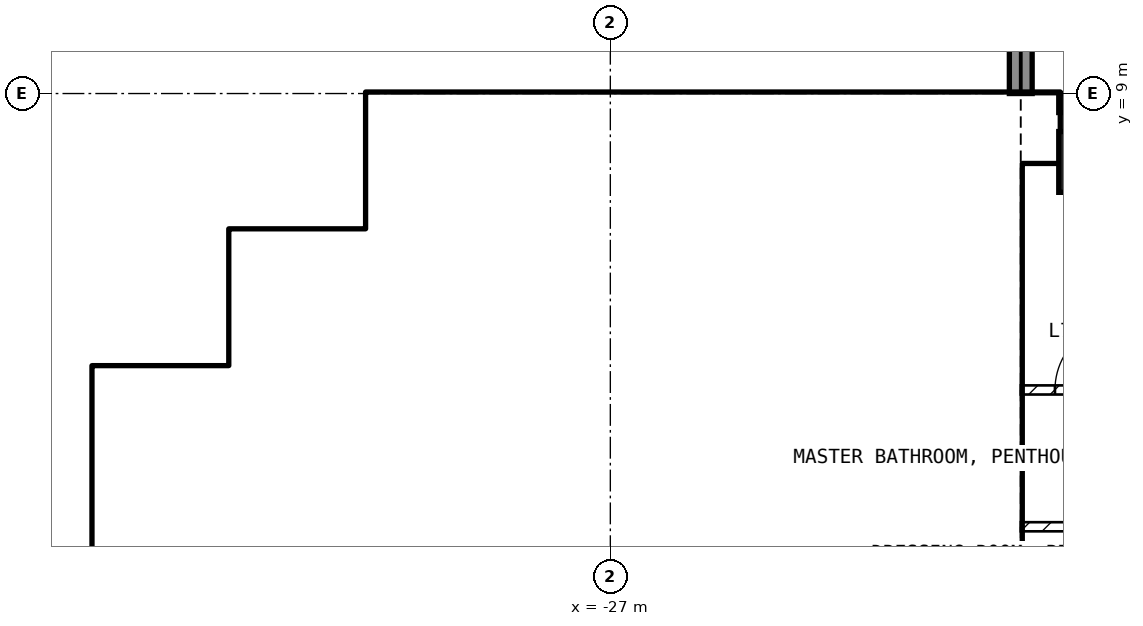
"""IFC4 building model, lengths in metres.
Left out: names, types, materials, properties, quantities, classifications, styles, units other than length and angle.
Written with IfcOpenShell. Run it as: python <this file> out.ifc"""

import sys

from ifc_helpers import new_model, si_unit, direction, frame, frame_2d, origin, origin_2d, place, context, subcontext, project, spatial, rectangle, extrude, element, fill, save


model = new_model("IFC4")
c1 = context("Model", 3, precision=1e-05, world=origin(), true_north=direction((0.0, 1.0)))
c2 = subcontext(c1, "Body", "Model", "MODEL_VIEW")
j1 = project(units=[si_unit("LENGTHUNIT", "METRE"), si_unit("PLANEANGLEUNIT", "RADIAN")], contexts=[c1])
p1 = place(None, origin())
s1 = spatial("IfcSite", under=j1, at=p1, CompositionType="ELEMENT")
p2 = place(p1, origin())
s2 = spatial("IfcBuilding", under=s1, at=p2, CompositionType="ELEMENT")
p3 = place(p2, frame((0.0, 0.0, 290.4)))
s3 = spatial("IfcBuildingStorey", under=s2, at=p3, CompositionType="ELEMENT", Elevation=290.4)
p4 = place(p3, frame((-20.7, 8.1, -0.25), z_axis=(0.0, 0.0, 1.0), x_axis=(1.0, 0.0, 0.0)))
e1 = element("IfcColumn", 1, at=p4, inside=s3, PredefinedType="COLUMN", context=c2, shape_type="SweptSolid", body=[
    extrude(rectangle(XDim=0.8, YDim=0.8, at=origin_2d()), origin(), (0.0, 0.0, 1.0), 4.2),
])
p5 = place(p3, frame((-18.06, 8.875, 0.0), z_axis=(0.0, 0.0, 1.0), x_axis=(-1.0, 0.0, 0.0)))
e2 = element("IfcWall", 2, at=p5, inside=s3, PredefinedType="SOLIDWALL", context=c2, shape_type="SweptSolid", body=[
    extrude(rectangle(XDim=3.04, YDim=0.25, at=frame_2d((1.52, 0.0))), origin(), (0.0, 0.0, 1.0), 3.95),
])
p6 = place(p5, frame((0.89, 0.0, 0.0)))
e3 = element("IfcOpeningElement", 3, at=p6, cuts=e2, PredefinedType="OPENING", context=c2, shape_type="SweptSolid", body=[
    extrude(rectangle(XDim=1.0, YDim=2.4, at=frame_2d((0.5, 1.2))), frame((0.0, 0.135, 0.0), z_axis=(0.0, -1.0, 0.0), x_axis=(1.0, 0.0, 0.0)), (0.0, 0.0, 1.0), 0.27),
])
p7 = place(p3, frame((-21.6, 9.0, 0.0), z_axis=(0.0, 0.0, 1.0), x_axis=(0.0, 1.0, 0.0)))
e4 = element("IfcWall", 4, at=p7, inside=s3, PredefinedType="SOLIDWALL", context=c2, shape_type="SweptSolid", body=[
    extrude(rectangle(XDim=2.7, YDim=0.3, at=frame_2d((1.35, 0.0))), origin(), (0.0, 0.0, 1.0), 3.95),
])
p8 = place(p3, frame((-33.575, -4.95, 0.0), z_axis=(0.0, 0.0, 1.0), x_axis=(0.0, 1.0, 0.0)))
e5 = element("IfcWall", 5, at=p8, inside=s3, PredefinedType="SHEAR", context=c2, shape_type="SweptSolid", body=[
    extrude(rectangle(XDim=10.35, YDim=0.45, at=frame_2d((5.175, 0.0))), origin(), (0.0, 0.0, 1.0), 3.95),
])
for number, where, z_axis, x_axis in (
    (6, (-33.35, 5.175, 0.0), (0.0, 0.0, 1.0), (1.0, 0.0, 0.0)),
    (7, (-31.775, 5.4, 0.0), (0.0, 0.0, 1.0), (0.0, 1.0, 0.0)),
    (8, (-31.55, 6.975, 0.0), (0.0, 0.0, 1.0), (1.0, 0.0, 0.0)),
    (9, (-29.975, 7.2, 0.0), (0.0, 0.0, 1.0), (0.0, 1.0, 0.0)),
):
    element("IfcWall", number, at=place(p3, frame(where, z_axis=z_axis, x_axis=x_axis)), inside=s3, PredefinedType="SHEAR", context=c2, shape_type="SweptSolid", body=[
        extrude(rectangle(XDim=1.8, YDim=0.45, at=frame_2d((0.9, 0.0))), origin(), (0.0, 0.0, 1.0), 3.95),
    ])
p9 = place(p3, frame((-29.75, 8.55, 0.0), z_axis=(0.0, 0.0, 1.0), x_axis=(1.0, 0.0, 0.0)))
e10 = element("IfcWall", 10, at=p9, inside=s3, PredefinedType="SHEAR", context=c2, shape_type="SweptSolid", body=[
    extrude(rectangle(XDim=8.65, YDim=0.9, at=frame_2d((4.325, 0.0))), origin(), (0.0, 0.0, 1.0), 3.95),
])
p10 = place(p3, frame((-21.825, 1.2, 0.0), z_axis=(0.0, 0.0, 1.0), x_axis=(0.0, 1.0, 0.0)))
e11 = element("IfcWall", 11, at=p10, inside=s3, PredefinedType="SHEAR", context=c2, shape_type="SweptSolid", body=[
    extrude(rectangle(XDim=6.9, YDim=0.45, at=frame_2d((3.45, 0.0))), origin(), (0.0, 0.0, 1.0), 3.95),
])
p11 = place(p3, frame((-28.35, 5.15, 0.0), z_axis=(0.0, 0.0, 1.0), x_axis=(1.0, 0.0, 0.0)))
e12 = element("IfcWall", 12, at=p11, inside=s3, PredefinedType="SOLIDWALL", context=c2, shape_type="SweptSolid", body=[
    extrude(rectangle(XDim=6.3, YDim=0.2, at=frame_2d((3.15, 0.0))), origin(), (0.0, 0.0, 1.0), 3.95),
])
p12 = place(p11, frame((5.1, 0.0, 0.0)))
e13 = element("IfcOpeningElement", 13, at=p12, cuts=e12, PredefinedType="OPENING", context=c2, shape_type="SweptSolid", body=[
    extrude(rectangle(XDim=1.0, YDim=2.1, at=frame_2d((0.5, 1.05))), frame((0.0, 0.11, 0.0), z_axis=(0.0, -1.0, 0.0), x_axis=(1.0, 0.0, 0.0)), (0.0, 0.0, 1.0), 0.22),
])
p13 = place(p3, frame((-28.25, 5.25, 0.0), z_axis=(0.0, 0.0, 1.0), x_axis=(0.0, 1.0, 0.0)))
e14 = element("IfcWall", 14, at=p13, inside=s3, PredefinedType="SOLIDWALL", context=c2, shape_type="SweptSolid", body=[
    extrude(rectangle(XDim=2.85, YDim=0.2, at=frame_2d((1.425, 0.0))), origin(), (0.0, 0.0, 1.0), 3.95),
])
p14 = place(p3, frame((-33.35, 3.95, 0.0), z_axis=(0.0, 0.0, 1.0), x_axis=(1.0, 0.0, 0.0)))
e15 = element("IfcWall", 15, at=p14, inside=s3, PredefinedType="SOLIDWALL", context=c2, shape_type="SweptSolid", body=[
    extrude(rectangle(XDim=6.15, YDim=0.2, at=frame_2d((3.075, 0.0))), origin(), (0.0, 0.0, 1.0), 3.95),
])
p15 = place(p3, frame((-27.1, 1.55, 0.0), z_axis=(0.0, 0.0, 1.0), x_axis=(0.0, 1.0, 0.0)))
e16 = element("IfcWall", 16, at=p15, inside=s3, PredefinedType="SOLIDWALL", context=c2, shape_type="SweptSolid", body=[
    extrude(rectangle(XDim=3.5, YDim=0.2, at=frame_2d((1.75, 0.0))), origin(), (0.0, 0.0, 1.0), 3.95),
])
p16 = place(p15, frame((0.6, 0.0, 0.0)))
e17 = element("IfcOpeningElement", 17, at=p16, cuts=e16, PredefinedType="OPENING", context=c2, shape_type="SweptSolid", body=[
    extrude(rectangle(XDim=1.1, YDim=2.1, at=frame_2d((0.55, 1.05))), frame((0.0, 0.11, 0.0), z_axis=(0.0, -1.0, 0.0), x_axis=(1.0, 0.0, 0.0)), (0.0, 0.0, 1.0), 0.22),
])
p17 = place(p15, frame((2.6, 0.0, 0.0)))
e18 = element("IfcOpeningElement", 18, at=p17, cuts=e16, PredefinedType="OPENING", context=c2, shape_type="SweptSolid", body=[
    extrude(rectangle(XDim=0.8, YDim=2.1, at=frame_2d((0.4, 1.05))), frame((0.0, 0.11, 0.0), z_axis=(0.0, -1.0, 0.0), x_axis=(1.0, 0.0, 0.0)), (0.0, 0.0, 1.0), 0.22),
])
p18 = place(p3, frame((-30.0, 1.55, 0.0), z_axis=(0.0, 0.0, 1.0), x_axis=(0.0, 1.0, 0.0)))
e19 = element("IfcWall", 19, at=p18, inside=s3, PredefinedType="SOLIDWALL", context=c2, shape_type="SweptSolid", body=[
    extrude(rectangle(XDim=2.3, YDim=0.2, at=frame_2d((1.15, 0.0))), origin(), (0.0, 0.0, 1.0), 3.95),
])
p19 = place(p3, frame((-21.6, 3.3, 0.0), z_axis=(0.0, 0.0, 1.0), x_axis=(1.0, 0.0, 0.0)))
e20 = element("IfcWall", 20, at=p19, inside=s3, PredefinedType="PARTITIONING", context=c2, shape_type="SweptSolid", body=[
    extrude(rectangle(XDim=1.8, YDim=0.12, at=frame_2d((0.9, 0.0))), origin(), (0.0, 0.0, 1.0), 3.95),
])
p20 = place(p3, frame((-21.6, 5.1, 0.0), z_axis=(0.0, 0.0, 1.0), x_axis=(1.0, 0.0, 0.0)))
e21 = element("IfcWall", 21, at=p20, inside=s3, PredefinedType="PARTITIONING", context=c2, shape_type="SweptSolid", body=[
    extrude(rectangle(XDim=1.8, YDim=0.12, at=frame_2d((0.9, 0.0))), origin(), (0.0, 0.0, 1.0), 3.95),
])
p21 = place(p20, frame((0.45, 0.0, 0.0)))
e22 = element("IfcOpeningElement", 22, at=p21, cuts=e21, PredefinedType="OPENING", context=c2, shape_type="SweptSolid", body=[
    extrude(rectangle(XDim=0.9, YDim=2.1, at=frame_2d((0.45, 1.05))), frame((0.0, 0.07, 0.0), z_axis=(0.0, -1.0, 0.0), x_axis=(1.0, 0.0, 0.0)), (0.0, 0.0, 1.0), 0.14),
])
p22 = place(p16, origin())
e23 = element("IfcDoor", 23, at=p22, inside=s3, OperationType="DOUBLE_DOOR_SLIDING", PredefinedType="DOOR", context=c2, shape_type="SweptSolid", body=[
    extrude(rectangle(XDim=1.1, YDim=2.1, at=frame_2d((0.55, 1.05))), frame((0.0, 0.025, 0.0), z_axis=(0.0, -1.0, 0.0), x_axis=(1.0, 0.0, 0.0)), (0.0, 0.0, 1.0), 0.05),
])
fill(e17, e23)
p23 = place(p12, origin())
e24 = element("IfcDoor", 24, at=p23, inside=s3, OperationType="SINGLE_SWING_LEFT", PredefinedType="DOOR", context=c2, shape_type="SweptSolid", body=[
    extrude(rectangle(XDim=1.0, YDim=2.1, at=frame_2d((0.5, 1.05))), frame((0.0, 0.025, 0.0), z_axis=(0.0, -1.0, 0.0), x_axis=(1.0, 0.0, 0.0)), (0.0, 0.0, 1.0), 0.05),
])
fill(e13, e24)
p24 = place(p17, origin())
e25 = element("IfcDoor", 25, at=p24, inside=s3, OperationType="SINGLE_SWING_LEFT", PredefinedType="DOOR", context=c2, shape_type="SweptSolid", body=[
    extrude(rectangle(XDim=0.8, YDim=2.1, at=frame_2d((0.4, 1.05))), frame((0.0, 0.025, 0.0), z_axis=(0.0, -1.0, 0.0), x_axis=(1.0, 0.0, 0.0)), (0.0, 0.0, 1.0), 0.05),
])
fill(e18, e25)
p25 = place(p21, origin())
e26 = element("IfcDoor", 26, at=p25, inside=s3, OperationType="SINGLE_SWING_RIGHT", PredefinedType="DOOR", context=c2, shape_type="SweptSolid", body=[
    extrude(rectangle(XDim=0.9, YDim=2.1, at=frame_2d((0.45, 1.05))), frame((0.0, 0.025, 0.0), z_axis=(0.0, -1.0, 0.0), x_axis=(1.0, 0.0, 0.0)), (0.0, 0.0, 1.0), 0.05),
])
fill(e22, e26)
save(model, sys.argv[1])
